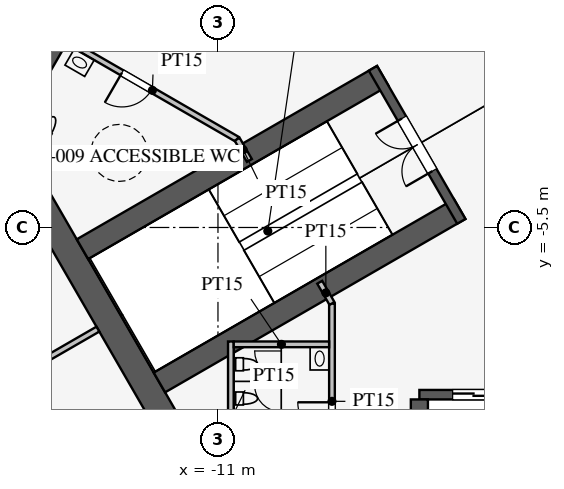
"""IFC4 building model, lengths in metres.
Left out: names, types, materials, properties, quantities, classifications, styles, units other than length and angle.
Written with IfcOpenShell. Run it as: python <this file> out.ifc"""

import sys

from ifc_helpers import new_model, si_unit, direction, frame, frame_2d, origin, place, context, subcontext, project, spatial, rectangle, extrude, element, fill, save


model = new_model("IFC4")
c1 = context("Model", 3, precision=1e-05, world=origin(), true_north=direction((0.0, 1.0)))
c2 = subcontext(c1, "Body", "Model", "MODEL_VIEW")
j1 = project(units=[si_unit("LENGTHUNIT", "METRE"), si_unit("PLANEANGLEUNIT", "RADIAN")], contexts=[c1])
p1 = place(None, origin())
s1 = spatial("IfcSite", under=j1, at=p1, CompositionType="ELEMENT")
p2 = place(p1, origin())
s2 = spatial("IfcBuilding", under=s1, at=p2, CompositionType="ELEMENT")
p3 = place(p2, frame((0.0, 0.0, 256.9)))
s3 = spatial("IfcBuildingStorey", under=s2, at=p3, CompositionType="ELEMENT", Elevation=256.9)
p4 = place(p3, frame((-5.773, 16.0, 0.0), z_axis=(0.0, 0.0, 1.0), x_axis=(-0.500002442456, -0.866023993627, 0.0)))
e1 = element("IfcWall", 1, at=p4, inside=s3, PredefinedType="SHEAR", context=c2, shape_type="SweptSolid", body=[
    extrude(rectangle(XDim=21.939, YDim=0.7, at=frame_2d((10.97, 0.0))), origin(), (0.0, 0.0, 1.0), 4.2),
])
p5 = place(p4, frame((17.27, 0.0, 0.0)))
e2 = element("IfcOpeningElement", 2, at=p5, cuts=e1, PredefinedType="OPENING", context=c2, shape_type="SweptSolid", body=[
    extrude(rectangle(XDim=1.2, YDim=2.1, at=frame_2d((0.6, 1.05))), frame((0.0, 0.36, 0.0), z_axis=(0.0, -1.0, 0.0), x_axis=(1.0, 0.0, 0.0)), (0.0, 0.0, 1.0), 0.72),
])
p6 = place(p4, frame((3.47, 0.0, 0.0)))
e3 = element("IfcOpeningElement", 3, at=p6, cuts=e1, PredefinedType="OPENING", context=c2, shape_type="SweptSolid", body=[
    extrude(rectangle(XDim=1.2, YDim=2.1, at=frame_2d((0.6, 1.05))), frame((0.0, 0.36, 0.0), z_axis=(0.0, -1.0, 0.0), x_axis=(1.0, 0.0, 0.0)), (0.0, 0.0, 1.0), 0.72),
])
p7 = place(p3, frame((-16.743, -3.0, 0.0), z_axis=(0.0, 0.0, 1.0), x_axis=(0.499995765644, -0.866027848477, 0.0)))
e4 = element("IfcWall", 4, at=p7, inside=s3, PredefinedType="SHEAR", context=c2, shape_type="SweptSolid", body=[
    extrude(rectangle(XDim=11.547, YDim=0.7, at=frame_2d((5.773, 0.0))), origin(), (0.0, 0.0, 1.0), 4.2),
])
p8 = place(p3, frame((-5.7, -9.9, 0.0), z_axis=(0.0, 0.0, 1.0), x_axis=(1.0, 0.0, 0.0)))
e5 = element("IfcWall", 5, at=p8, inside=s3, PredefinedType="SHEAR", context=c2, shape_type="SweptSolid", body=[
    extrude(rectangle(XDim=11.4, YDim=0.25, at=frame_2d((5.7, 0.0))), origin(), (0.0, 0.0, 1.0), 4.2),
])
p9 = place(p8, frame((0.875, 0.0, 0.0)))
e6 = element("IfcOpeningElement", 6, at=p9, cuts=e5, PredefinedType="OPENING", context=c2, shape_type="SweptSolid", body=[
    extrude(rectangle(XDim=1.1, YDim=2.2, at=frame_2d((0.55, 1.1))), frame((0.0, 0.135, 0.0), z_axis=(0.0, -1.0, 0.0), x_axis=(1.0, 0.0, 0.0)), (0.0, 0.0, 1.0), 0.27),
])
p10 = place(p8, frame((3.725, 0.0, 0.0)))
e7 = element("IfcOpeningElement", 7, at=p10, cuts=e5, PredefinedType="OPENING", context=c2, shape_type="SweptSolid", body=[
    extrude(rectangle(XDim=1.1, YDim=2.2, at=frame_2d((0.55, 1.1))), frame((0.0, 0.135, 0.0), z_axis=(0.0, -1.0, 0.0), x_axis=(1.0, 0.0, 0.0)), (0.0, 0.0, 1.0), 0.27),
])
p11 = place(p8, frame((6.575, 0.0, 0.0)))
e8 = element("IfcOpeningElement", 8, at=p11, cuts=e5, PredefinedType="OPENING", context=c2, shape_type="SweptSolid", body=[
    extrude(rectangle(XDim=1.1, YDim=2.2, at=frame_2d((0.55, 1.1))), frame((0.0, 0.135, 0.0), z_axis=(0.0, -1.0, 0.0), x_axis=(1.0, 0.0, 0.0)), (0.0, 0.0, 1.0), 0.27),
])
p12 = place(p8, frame((9.425, 0.0, 0.0)))
e9 = element("IfcOpeningElement", 9, at=p12, cuts=e5, PredefinedType="OPENING", context=c2, shape_type="SweptSolid", body=[
    extrude(rectangle(XDim=1.1, YDim=2.2, at=frame_2d((0.55, 1.1))), frame((0.0, 0.135, 0.0), z_axis=(0.0, -1.0, 0.0), x_axis=(1.0, 0.0, 0.0)), (0.0, 0.0, 1.0), 0.27),
])
p13 = place(p3, frame((-5.7, -10.025, 0.0), z_axis=(0.0, 0.0, 1.0), x_axis=(0.0, -1.0, 0.0)))
e10 = element("IfcWall", 10, at=p13, inside=s3, PredefinedType="SHEAR", context=c2, shape_type="SweptSolid", body=[
    extrude(rectangle(XDim=2.625, YDim=0.45, at=frame_2d((1.312, 0.0))), origin(), (0.0, 0.0, 1.0), 4.2),
])
for number, where, z_axis, x_axis in (
    (11, (-6.663, -1.509, 0.0), (0.0, 0.0, 1.0), (-0.866, -0.5, 0.0)),
    (12, (-4.638, -5.016, 0.0), (0.0, 0.0, 1.0), (-0.866, -0.5, 0.0)),
):
    element("IfcWall", number, at=place(p3, frame(where, z_axis=z_axis, x_axis=x_axis)), inside=s3, PredefinedType="SHEAR", context=c2, shape_type="SweptSolid", body=[
        extrude(rectangle(XDim=9.125, YDim=0.6, at=frame_2d((4.562, 0.0))), origin(), (0.0, 0.0, 1.0), 4.2),
    ])
p14 = place(p3, frame((-6.922, -1.312, 0.0), z_axis=(0.0, 0.0, 1.0), x_axis=(0.499984536904, -0.866034331223, 0.0)))
e13 = element("IfcWall", 13, at=p14, inside=s3, PredefinedType="SHEAR", context=c2, shape_type="SweptSolid", body=[
    extrude(rectangle(XDim=4.65, YDim=0.25, at=frame_2d((2.325, 0.0))), origin(), (0.0, 0.0, 1.0), 4.2),
])
p15 = place(p14, frame((1.525, 0.0, 0.0)))
e14 = element("IfcOpeningElement", 14, at=p15, cuts=e13, PredefinedType="OPENING", context=c2, shape_type="SweptSolid", body=[
    extrude(rectangle(XDim=1.6, YDim=2.1, at=frame_2d((0.8, 1.05))), frame((0.0, 0.135, 0.0), z_axis=(0.0, -1.0, 0.0), x_axis=(1.0, 0.0, 0.0)), (0.0, 0.0, 1.0), 0.27),
])
p16 = place(p3, frame((-8.0, -7.5, 0.0), z_axis=(0.0, 0.0, 1.0), x_axis=(0.0, -1.0, 0.0)))
e15 = element("IfcWall", 15, at=p16, inside=s3, PredefinedType="PARTITIONING", context=c2, shape_type="SweptSolid", body=[
    extrude(rectangle(XDim=5.15, YDim=0.15, at=frame_2d((2.575, 0.0))), origin(), (0.0, 0.0, 1.0), 4.0),
])
p17 = place(p16, frame((2.6, 0.0, 0.0)))
e16 = element("IfcOpeningElement", 16, at=p17, cuts=e15, PredefinedType="OPENING", context=c2, shape_type="SweptSolid", body=[
    extrude(rectangle(XDim=0.9, YDim=2.1, at=frame_2d((0.45, 1.05))), frame((0.0, 0.085, 0.0), z_axis=(0.0, -1.0, 0.0), x_axis=(1.0, 0.0, 0.0)), (0.0, 0.0, 1.0), 0.17),
])
p18 = place(p3, frame((-10.495, -3.178, 0.0), z_axis=(0.0, 0.0, 1.0), x_axis=(-0.866037967349, 0.499978238636, 0.0)))
e17 = element("IfcWall", 17, at=p18, inside=s3, PredefinedType="PARTITIONING", context=c2, shape_type="SweptSolid", body=[
    extrude(rectangle(XDim=5.15, YDim=0.15, at=frame_2d((2.575, 0.0))), origin(), (0.0, 0.0, 1.0), 4.0),
])
p19 = place(p18, frame((2.6, 0.0, 0.0)))
e18 = element("IfcOpeningElement", 18, at=p19, cuts=e17, PredefinedType="OPENING", context=c2, shape_type="SweptSolid", body=[
    extrude(rectangle(XDim=0.9, YDim=2.1, at=frame_2d((0.45, 1.05))), frame((0.0, 0.085, 0.0), z_axis=(0.0, -1.0, 0.0), x_axis=(1.0, 0.0, 0.0)), (0.0, 0.0, 1.0), 0.17),
])
for number, where, z_axis, x_axis in (
    (19, (-10.495, -3.178, 0.0), (0.0, 0.0, 1.0), (0.5, -0.866, 0.0)),
    (20, (-8.0, -7.5, 0.0), (0.0, 0.0, 1.0), (-0.5, 0.866, 0.0)),
):
    element("IfcWall", number, at=place(p3, frame(where, z_axis=z_axis, x_axis=x_axis)), inside=s3, PredefinedType="PARTITIONING", context=c2, shape_type="SweptSolid", body=[
        extrude(rectangle(XDim=0.645, YDim=0.15, at=frame_2d((0.323, 0.0))), origin(), (0.0, 0.0, 1.0), 4.0),
    ])
p20 = place(p3, frame((-10.66, -8.5, 0.0), z_axis=(0.0, 0.0, 1.0), x_axis=(0.0, -1.0, 0.0)))
e21 = element("IfcWall", 21, at=p20, inside=s3, PredefinedType="PARTITIONING", context=c2, shape_type="SweptSolid", body=[
    extrude(rectangle(XDim=4.1, YDim=0.15, at=frame_2d((2.05, 0.0))), origin(), (0.0, 0.0, 1.0), 4.0),
])
p21 = place(p3, frame((-8.075, -8.575, 0.0), z_axis=(0.0, 0.0, 1.0), x_axis=(-1.0, 0.0, 0.0)))
e22 = element("IfcWall", 22, at=p21, inside=s3, PredefinedType="PARTITIONING", context=c2, shape_type="SweptSolid", body=[
    extrude(rectangle(XDim=2.51, YDim=0.15, at=frame_2d((1.255, 0.0))), origin(), (0.0, 0.0, 1.0), 4.0),
])
p22 = place(p3, frame((-14.159, -8.175, 0.0), z_axis=(0.0, 0.0, 1.0), x_axis=(-0.866027028085, -0.499997186618, 0.0)))
e23 = element("IfcWall", 23, at=p22, inside=s3, PredefinedType="PARTITIONING", context=c2, shape_type="SweptSolid", body=[
    extrude(rectangle(XDim=15.0, YDim=0.15, at=frame_2d((7.5, 0.0))), origin(), (0.0, 0.0, 1.0), 2.4),
])
p23 = place(p3, frame((-0.016, 30.392, 0.0), z_axis=(0.0, 0.0, 1.0), x_axis=(-0.500000626146, -0.866025042278, 0.0)))
e24 = element("IfcWall", 24, at=p23, inside=s3, PredefinedType="PARTITIONING", context=c2, shape_type="SweptSolid", body=[
    extrude(rectangle(XDim=52.624, YDim=0.12, at=frame_2d((26.312, 0.0))), origin(), (0.0, 0.0, 1.0), 2.9),
])
p24 = place(p23, frame((10.15, 0.0, 0.15)))
e25 = element("IfcOpeningElement", 25, at=p24, cuts=e24, PredefinedType="OPENING", context=c2, shape_type="SweptSolid", body=[
    extrude(rectangle(XDim=1.8, YDim=2.1, at=frame_2d((0.9, 1.05))), frame((0.0, 0.07, 0.0), z_axis=(0.0, -1.0, 0.0), x_axis=(1.0, 0.0, 0.0)), (0.0, 0.0, 1.0), 0.14),
])
p25 = place(p23, frame((40.65, 0.0, 0.15)))
e26 = element("IfcOpeningElement", 26, at=p25, cuts=e24, PredefinedType="OPENING", context=c2, shape_type="SweptSolid", body=[
    extrude(rectangle(XDim=1.8, YDim=2.1, at=frame_2d((0.9, 1.05))), frame((0.0, 0.07, 0.0), z_axis=(0.0, -1.0, 0.0), x_axis=(1.0, 0.0, 0.0)), (0.0, 0.0, 1.0), 0.14),
])
p26 = place(p17, frame((0.9, 0.0, 0.0), z_axis=(0.0, 0.0, 1.0), x_axis=(-1.0, 0.0, 0.0)))
e27 = element("IfcDoor", 27, at=p26, inside=s3, OperationType="SINGLE_SWING_RIGHT", PredefinedType="DOOR", context=c2, shape_type="SweptSolid", body=[
    extrude(rectangle(XDim=0.9, YDim=2.1, at=frame_2d((0.45, 1.05))), frame((0.0, 0.025, 0.0), z_axis=(0.0, -1.0, 0.0), x_axis=(1.0, 0.0, 0.0)), (0.0, 0.0, 1.0), 0.05),
])
fill(e16, e27)
p27 = place(p19, origin())
e28 = element("IfcDoor", 28, at=p27, inside=s3, OperationType="SINGLE_SWING_RIGHT", PredefinedType="DOOR", context=c2, shape_type="SweptSolid", body=[
    extrude(rectangle(XDim=0.9, YDim=2.1, at=frame_2d((0.45, 1.05))), frame((0.0, 0.025, 0.0), z_axis=(0.0, -1.0, 0.0), x_axis=(1.0, 0.0, 0.0)), (0.0, 0.0, 1.0), 0.05),
])
fill(e18, e28)
p28 = place(p15, frame((1.6, 0.0, 0.0), z_axis=(0.0, 0.0, 1.0), x_axis=(-1.0, 0.0, 0.0)))
e29 = element("IfcDoor", 29, at=p28, inside=s3, OperationType="DOUBLE_DOOR_SINGLE_SWING", PredefinedType="DOOR", context=c2, shape_type="SweptSolid", body=[
    extrude(rectangle(XDim=1.6, YDim=2.1, at=frame_2d((0.8, 1.05))), frame((0.0, 0.025, 0.0), z_axis=(0.0, -1.0, 0.0), x_axis=(1.0, 0.0, 0.0)), (0.0, 0.0, 1.0), 0.05),
])
fill(e14, e29)
p29 = place(p9, origin())
e30 = element("IfcDoor", 30, at=p29, inside=s3, OperationType="DOUBLE_DOOR_SLIDING", PredefinedType="DOOR", context=c2, shape_type="SweptSolid", body=[
    extrude(rectangle(XDim=1.1, YDim=2.2, at=frame_2d((0.55, 1.1))), frame((0.0, 0.025, 0.0), z_axis=(0.0, -1.0, 0.0), x_axis=(1.0, 0.0, 0.0)), (0.0, 0.0, 1.0), 0.05),
])
fill(e6, e30)
save(model, sys.argv[1])
